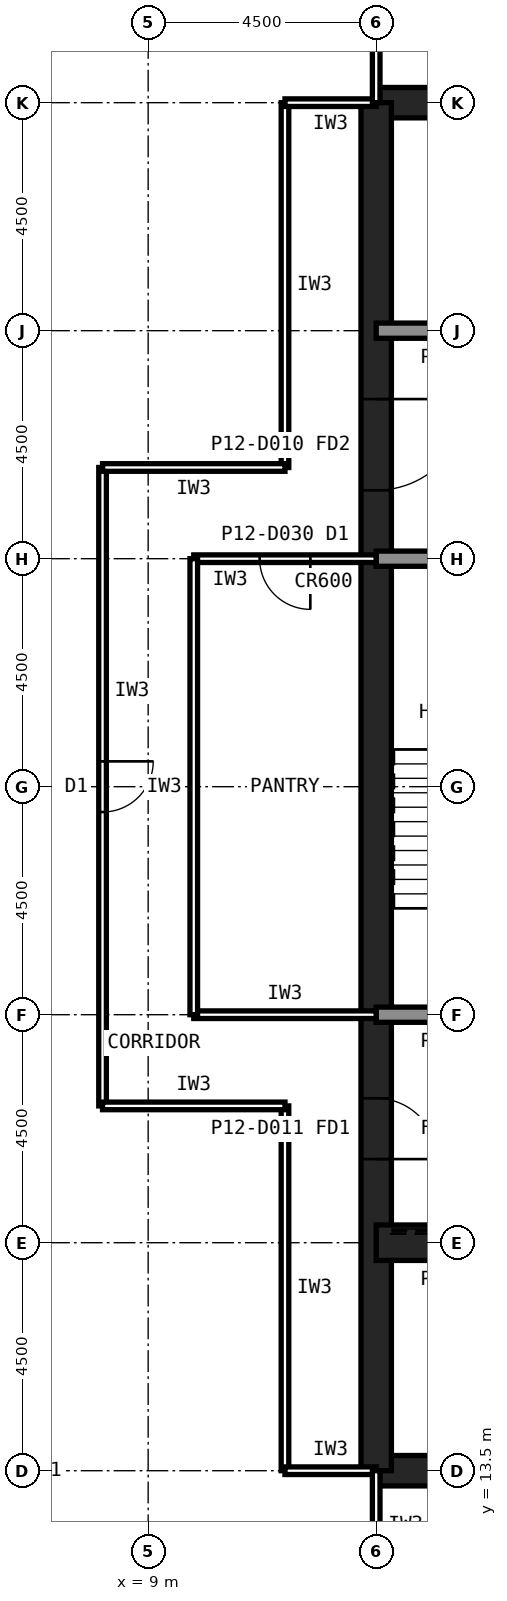
"""IFC4 building model, lengths in metres.
Left out: names, types, materials, properties, quantities, classifications, styles, units other than length and angle.
Written with IfcOpenShell. Run it as: python <this file> out.ifc"""

import sys

from ifc_helpers import new_model, si_unit, direction, frame, frame_2d, origin, place, context, subcontext, project, spatial, rectangle, extrude, element, fill, save


model = new_model("IFC4")
c1 = context("Model", 3, precision=1e-05, world=origin(), true_north=direction((0.0, 1.0)))
c2 = subcontext(c1, "Body", "Model", "MODEL_VIEW")
j1 = project(units=[si_unit("LENGTHUNIT", "METRE"), si_unit("PLANEANGLEUNIT", "RADIAN")], contexts=[c1])
p1 = place(None, origin())
s1 = spatial("IfcSite", under=j1, at=p1, CompositionType="ELEMENT")
p2 = place(p1, origin())
s2 = spatial("IfcBuilding", under=s1, at=p2, CompositionType="ELEMENT")
p3 = place(p2, frame((0.0, 0.0, 54.2)))
s3 = spatial("IfcBuildingStorey", under=s2, at=p3, CompositionType="ELEMENT", Elevation=54.2)
for number, where, z_axis, x_axis in (
    (1, (13.5, 13.5, 0.0), (0.0, 0.0, 1.0), (1.0, 0.0, 0.0)),
    (2, (40.5, 40.5, 0.0), (0.0, 0.0, 1.0), (-1.0, 0.0, 0.0)),
):
    element("IfcWall", number, at=place(p3, frame(where, z_axis=z_axis, x_axis=x_axis)), inside=s3, PredefinedType="SHEAR", context=c2, shape_type="SweptSolid", body=[
        extrude(rectangle(XDim=27.0, YDim=0.6, at=frame_2d((13.5, 0.0))), origin(), (0.0, 0.0, 1.0), 4.2),
    ])
p4 = place(p3, frame((13.5, 40.5, 0.0), z_axis=(0.0, 0.0, 1.0), x_axis=(0.0, -1.0, 0.0)))
e3 = element("IfcWall", 3, at=p4, inside=s3, PredefinedType="SHEAR", context=c2, shape_type="SweptSolid", body=[
    extrude(rectangle(XDim=27.0, YDim=0.6, at=frame_2d((13.5, 0.0))), origin(), (0.0, 0.0, 1.0), 4.2),
])
p5 = place(p4, frame((19.65, 0.0, 0.0)))
e4 = element("IfcOpeningElement", 4, at=p5, cuts=e3, PredefinedType="OPENING", context=c2, shape_type="SweptSolid", body=[
    extrude(rectangle(XDim=1.2, YDim=2.1, at=frame_2d((0.6, 1.05))), frame((0.0, 0.31, 0.0), z_axis=(0.0, -1.0, 0.0), x_axis=(1.0, 0.0, 0.0)), (0.0, 0.0, 1.0), 0.62),
])
p6 = place(p4, frame((5.85, 0.0, 0.0)))
e5 = element("IfcOpeningElement", 5, at=p6, cuts=e3, PredefinedType="OPENING", context=c2, shape_type="SweptSolid", body=[
    extrude(rectangle(XDim=1.8, YDim=2.1, at=frame_2d((0.9, 1.05))), frame((0.0, 0.31, 0.0), z_axis=(0.0, -1.0, 0.0), x_axis=(1.0, 0.0, 0.0)), (0.0, 0.0, 1.0), 0.62),
])
p7 = place(p3, frame((13.5, 18.0, 0.0), z_axis=(0.0, 0.0, 1.0), x_axis=(1.0, 0.0, 0.0)))
e6 = element("IfcWall", 6, at=p7, inside=s3, PredefinedType="SHEAR", context=c2, shape_type="SweptSolid", body=[
    extrude(rectangle(XDim=27.0, YDim=0.7, at=frame_2d((13.5, 0.0))), origin(), (0.0, 0.0, 1.0), 4.2),
])
p8 = place(p7, frame((24.3, 0.0, 0.0)))
e7 = element("IfcOpeningElement", 7, at=p8, cuts=e6, PredefinedType="OPENING", context=c2, shape_type="SweptSolid", body=[
    extrude(rectangle(XDim=0.9, YDim=2.1, at=frame_2d((0.45, 1.05))), frame((0.0, 0.36, 0.0), z_axis=(0.0, -1.0, 0.0), x_axis=(1.0, 0.0, 0.0)), (0.0, 0.0, 1.0), 0.72),
])
p9 = place(p7, frame((5.45, 0.0, 0.0)))
e8 = element("IfcOpeningElement", 8, at=p9, cuts=e6, PredefinedType="OPENING", context=c2, shape_type="SweptSolid", body=[
    extrude(rectangle(XDim=1.1, YDim=2.1, at=frame_2d((0.55, 1.05))), frame((0.0, 0.36, 0.0), z_axis=(0.0, -1.0, 0.0), x_axis=(1.0, 0.0, 0.0)), (0.0, 0.0, 1.0), 0.72),
])
p10 = place(p7, frame((8.45, 0.0, 0.0)))
e9 = element("IfcOpeningElement", 9, at=p10, cuts=e6, PredefinedType="OPENING", context=c2, shape_type="SweptSolid", body=[
    extrude(rectangle(XDim=1.1, YDim=2.1, at=frame_2d((0.55, 1.05))), frame((0.0, 0.36, 0.0), z_axis=(0.0, -1.0, 0.0), x_axis=(1.0, 0.0, 0.0)), (0.0, 0.0, 1.0), 0.72),
])
p11 = place(p7, frame((11.45, 0.0, 0.0)))
e10 = element("IfcOpeningElement", 10, at=p11, cuts=e6, PredefinedType="OPENING", context=c2, shape_type="SweptSolid", body=[
    extrude(rectangle(XDim=1.1, YDim=2.1, at=frame_2d((0.55, 1.05))), frame((0.0, 0.36, 0.0), z_axis=(0.0, -1.0, 0.0), x_axis=(1.0, 0.0, 0.0)), (0.0, 0.0, 1.0), 0.72),
])
p12 = place(p7, frame((14.45, 0.0, 0.0)))
e11 = element("IfcOpeningElement", 11, at=p12, cuts=e6, PredefinedType="OPENING", context=c2, shape_type="SweptSolid", body=[
    extrude(rectangle(XDim=1.1, YDim=2.1, at=frame_2d((0.55, 1.05))), frame((0.0, 0.36, 0.0), z_axis=(0.0, -1.0, 0.0), x_axis=(1.0, 0.0, 0.0)), (0.0, 0.0, 1.0), 0.72),
])
p13 = place(p7, frame((17.45, 0.0, 0.0)))
e12 = element("IfcOpeningElement", 12, at=p13, cuts=e6, PredefinedType="OPENING", context=c2, shape_type="SweptSolid", body=[
    extrude(rectangle(XDim=1.1, YDim=2.1, at=frame_2d((0.55, 1.05))), frame((0.0, 0.36, 0.0), z_axis=(0.0, -1.0, 0.0), x_axis=(1.0, 0.0, 0.0)), (0.0, 0.0, 1.0), 0.72),
])
p14 = place(p7, frame((20.45, 0.0, 0.0)))
e13 = element("IfcOpeningElement", 13, at=p14, cuts=e6, PredefinedType="OPENING", context=c2, shape_type="SweptSolid", body=[
    extrude(rectangle(XDim=1.1, YDim=2.1, at=frame_2d((0.55, 1.05))), frame((0.0, 0.36, 0.0), z_axis=(0.0, -1.0, 0.0), x_axis=(1.0, 0.0, 0.0)), (0.0, 0.0, 1.0), 0.72),
])
p15 = place(p7, frame((1.6, 0.0, 0.0)))
e14 = element("IfcOpeningElement", 14, at=p15, cuts=e6, PredefinedType="OPENING", context=c2, shape_type="SweptSolid", body=[
    extrude(rectangle(XDim=1.3, YDim=2.2, at=frame_2d((0.65, 1.1))), frame((0.0, 0.36, 0.0), z_axis=(0.0, -1.0, 0.0), x_axis=(1.0, 0.0, 0.0)), (0.0, 0.0, 1.0), 0.72),
])
p16 = place(p3, frame((13.5, 36.0, 0.0), z_axis=(0.0, 0.0, 1.0), x_axis=(1.0, 0.0, 0.0)))
e15 = element("IfcWall", 15, at=p16, inside=s3, PredefinedType="SOLIDWALL", context=c2, shape_type="SweptSolid", body=[
    extrude(rectangle(XDim=27.0, YDim=0.3, at=frame_2d((13.5, 0.0))), origin(), (0.0, 0.0, 1.0), 4.04),
])
p17 = place(p16, frame((1.8, 0.0, 0.0)))
e16 = element("IfcOpeningElement", 16, at=p17, cuts=e15, PredefinedType="OPENING", context=c2, shape_type="SweptSolid", body=[
    extrude(rectangle(XDim=0.9, YDim=2.1, at=frame_2d((0.45, 1.05))), frame((0.0, 0.16, 0.0), z_axis=(0.0, -1.0, 0.0), x_axis=(1.0, 0.0, 0.0)), (0.0, 0.0, 1.0), 0.32),
])
p18 = place(p16, frame((24.1, 0.0, 0.0)))
e17 = element("IfcOpeningElement", 17, at=p18, cuts=e15, PredefinedType="OPENING", context=c2, shape_type="SweptSolid", body=[
    extrude(rectangle(XDim=1.3, YDim=2.2, at=frame_2d((0.65, 1.1))), frame((0.0, 0.16, 0.0), z_axis=(0.0, -1.0, 0.0), x_axis=(1.0, 0.0, 0.0)), (0.0, 0.0, 1.0), 0.32),
])
p19 = place(p3, frame((13.5, 22.5, 0.0), z_axis=(0.0, 0.0, 1.0), x_axis=(1.0, 0.0, 0.0)))
e18 = element("IfcWall", 18, at=p19, inside=s3, PredefinedType="SOLIDWALL", context=c2, shape_type="SweptSolid", body=[
    extrude(rectangle(XDim=27.0, YDim=0.3, at=frame_2d((13.5, 0.0))), origin(), (0.0, 0.0, 1.0), 4.04),
])
p20 = place(p19, frame((1.65, 0.0, 0.0)))
e19 = element("IfcOpeningElement", 19, at=p20, cuts=e18, PredefinedType="OPENING", context=c2, shape_type="SweptSolid", body=[
    extrude(rectangle(XDim=1.2, YDim=2.1, at=frame_2d((0.6, 1.05))), frame((0.0, 0.16, 0.0), z_axis=(0.0, -1.0, 0.0), x_axis=(1.0, 0.0, 0.0)), (0.0, 0.0, 1.0), 0.32),
])
p21 = place(p19, frame((6.025, 0.0, 0.0)))
e20 = element("IfcOpeningElement", 20, at=p21, cuts=e18, PredefinedType="OPENING", context=c2, shape_type="SweptSolid", body=[
    extrude(rectangle(XDim=1.0, YDim=2.1, at=frame_2d((0.5, 1.05))), frame((0.0, 0.16, 0.0), z_axis=(0.0, -1.0, 0.0), x_axis=(1.0, 0.0, 0.0)), (0.0, 0.0, 1.0), 0.32),
])
p22 = place(p19, frame((10.525, 0.0, 0.0)))
e21 = element("IfcOpeningElement", 21, at=p22, cuts=e18, PredefinedType="OPENING", context=c2, shape_type="SweptSolid", body=[
    extrude(rectangle(XDim=1.0, YDim=2.1, at=frame_2d((0.5, 1.05))), frame((0.0, 0.16, 0.0), z_axis=(0.0, -1.0, 0.0), x_axis=(1.0, 0.0, 0.0)), (0.0, 0.0, 1.0), 0.32),
])
p23 = place(p19, frame((19.75, 0.0, 0.0)))
e22 = element("IfcOpeningElement", 22, at=p23, cuts=e18, PredefinedType="OPENING", context=c2, shape_type="SweptSolid", body=[
    extrude(rectangle(XDim=1.0, YDim=2.1, at=frame_2d((0.5, 1.05))), frame((0.0, 0.16, 0.0), z_axis=(0.0, -1.0, 0.0), x_axis=(1.0, 0.0, 0.0)), (0.0, 0.0, 1.0), 0.32),
])
p24 = place(p19, frame((15.05, 0.0, 0.0)))
e23 = element("IfcOpeningElement", 23, at=p24, cuts=e18, PredefinedType="OPENING", context=c2, shape_type="SweptSolid", body=[
    extrude(rectangle(XDim=1.4, YDim=2.4, at=frame_2d((0.7, 1.2))), frame((0.0, 0.16, 0.0), z_axis=(0.0, -1.0, 0.0), x_axis=(1.0, 0.0, 0.0)), (0.0, 0.0, 1.0), 0.32),
])
p25 = place(p3, frame((13.5, 31.5, 0.0), z_axis=(0.0, 0.0, 1.0), x_axis=(1.0, 0.0, 0.0)))
e24 = element("IfcWall", 24, at=p25, inside=s3, PredefinedType="SOLIDWALL", context=c2, shape_type="SweptSolid", body=[
    extrude(rectangle(XDim=27.0, YDim=0.3, at=frame_2d((13.5, 0.0))), origin(), (0.0, 0.0, 1.0), 4.04),
])
p26 = place(p25, frame((24.15, 0.0, 0.0)))
e25 = element("IfcOpeningElement", 25, at=p26, cuts=e24, PredefinedType="OPENING", context=c2, shape_type="SweptSolid", body=[
    extrude(rectangle(XDim=1.2, YDim=2.1, at=frame_2d((0.6, 1.05))), frame((0.0, 0.16, 0.0), z_axis=(0.0, -1.0, 0.0), x_axis=(1.0, 0.0, 0.0)), (0.0, 0.0, 1.0), 0.32),
])
p27 = place(p25, frame((15.3, 0.0, 0.0)))
e26 = element("IfcOpeningElement", 26, at=p27, cuts=e24, PredefinedType="OPENING", context=c2, shape_type="SweptSolid", body=[
    extrude(rectangle(XDim=0.9, YDim=2.1, at=frame_2d((0.45, 1.05))), frame((0.0, 0.16, 0.0), z_axis=(0.0, -1.0, 0.0), x_axis=(1.0, 0.0, 0.0)), (0.0, 0.0, 1.0), 0.32),
])
p28 = place(p25, frame((19.8, 0.0, 0.0)))
e27 = element("IfcOpeningElement", 27, at=p28, cuts=e24, PredefinedType="OPENING", context=c2, shape_type="SweptSolid", body=[
    extrude(rectangle(XDim=0.9, YDim=2.1, at=frame_2d((0.45, 1.05))), frame((0.0, 0.16, 0.0), z_axis=(0.0, -1.0, 0.0), x_axis=(1.0, 0.0, 0.0)), (0.0, 0.0, 1.0), 0.32),
])
p29 = place(p3, frame((8.1, 33.3, 0.0), z_axis=(0.0, 0.0, 1.0), x_axis=(0.0, -1.0, 0.0)))
e28 = element("IfcWall", 28, at=p29, inside=s3, PredefinedType="PARTITIONING", context=c2, shape_type="SweptSolid", body=[
    extrude(rectangle(XDim=12.6, YDim=0.15, at=frame_2d((6.3, 0.0))), origin(), (0.0, 0.0, 1.0), 4.04),
])
p30 = place(p29, frame((5.8, 0.0, 0.0)))
e29 = element("IfcOpeningElement", 29, at=p30, cuts=e28, PredefinedType="OPENING", context=c2, shape_type="SweptSolid", body=[
    extrude(rectangle(XDim=1.0, YDim=2.1, at=frame_2d((0.5, 1.05))), frame((0.0, 0.085, 0.0), z_axis=(0.0, -1.0, 0.0), x_axis=(1.0, 0.0, 0.0)), (0.0, 0.0, 1.0), 0.17),
])
for number, where, z_axis, x_axis in (
    (30, (11.7, 20.7, 0.0), (0.0, 0.0, 1.0), (0.0, -1.0, 0.0)),
    (31, (11.7, 40.5, 0.0), (0.0, 0.0, 1.0), (0.0, -1.0, 0.0)),
):
    element("IfcWall", number, at=place(p3, frame(where, z_axis=z_axis, x_axis=x_axis)), inside=s3, PredefinedType="PARTITIONING", context=c2, shape_type="SweptSolid", body=[
        extrude(rectangle(XDim=7.2, YDim=0.15, at=frame_2d((3.6, 0.0))), origin(), (0.0, 0.0, 1.0), 4.04),
    ])
for number, where, z_axis, x_axis in (
    (32, (8.1, 20.7, 0.0), (0.0, 0.0, 1.0), (1.0, 0.0, 0.0)),
    (33, (11.7, 33.3, 0.0), (0.0, 0.0, 1.0), (-1.0, 0.0, 0.0)),
):
    element("IfcWall", number, at=place(p3, frame(where, z_axis=z_axis, x_axis=x_axis)), inside=s3, PredefinedType="PARTITIONING", context=c2, shape_type="SweptSolid", body=[
        extrude(rectangle(XDim=3.6, YDim=0.15, at=frame_2d((1.8, 0.0))), origin(), (0.0, 0.0, 1.0), 4.04),
    ])
for number, where, z_axis, x_axis in (
    (34, (11.7, 13.5, 0.0), (0.0, 0.0, 1.0), (1.0, 0.0, 0.0)),
    (35, (13.5, 40.5, 0.0), (0.0, 0.0, 1.0), (-1.0, 0.0, 0.0)),
):
    element("IfcWall", number, at=place(p3, frame(where, z_axis=z_axis, x_axis=x_axis)), inside=s3, PredefinedType="PARTITIONING", context=c2, shape_type="SweptSolid", body=[
        extrude(rectangle(XDim=1.8, YDim=0.15, at=frame_2d((0.9, 0.0))), origin(), (0.0, 0.0, 1.0), 3.189),
    ])
p31 = place(p3, frame((13.5, 13.5, 0.0), z_axis=(0.0, 0.0, 1.0), x_axis=(0.0, -1.0, 0.0)))
e36 = element("IfcWall", 36, at=p31, inside=s3, PredefinedType="PARTITIONING", context=c2, shape_type="SweptSolid", body=[
    extrude(rectangle(XDim=5.4, YDim=0.15, at=frame_2d((2.7, 0.0))), origin(), (0.0, 0.0, 1.0), 3.189),
])
p32 = place(p31, frame((2.2, 0.0, 0.0)))
e37 = element("IfcOpeningElement", 37, at=p32, cuts=e36, PredefinedType="OPENING", context=c2, shape_type="SweptSolid", body=[
    extrude(rectangle(XDim=1.0, YDim=2.1, at=frame_2d((0.5, 1.05))), frame((0.0, 0.085, 0.0), z_axis=(0.0, -1.0, 0.0), x_axis=(1.0, 0.0, 0.0)), (0.0, 0.0, 1.0), 0.17),
])
p33 = place(p3, frame((13.5, 45.0, 0.0), z_axis=(0.0, 0.0, 1.0), x_axis=(0.0, -1.0, 0.0)))
e38 = element("IfcWall", 38, at=p33, inside=s3, PredefinedType="PARTITIONING", context=c2, shape_type="SweptSolid", body=[
    extrude(rectangle(XDim=4.5, YDim=0.15, at=frame_2d((2.25, 0.0))), origin(), (0.0, 0.0, 1.0), 3.189),
])
p34 = place(p3, frame((9.9, 22.5, 0.0), z_axis=(0.0, 0.0, 1.0), x_axis=(1.0, 0.0, 0.0)))
e39 = element("IfcWall", 39, at=p34, inside=s3, PredefinedType="PARTITIONING", context=c2, shape_type="SweptSolid", body=[
    extrude(rectangle(XDim=3.6, YDim=0.15, at=frame_2d((1.8, 0.0))), origin(), (0.0, 0.0, 1.0), 3.189),
])
p35 = place(p3, frame((13.5, 31.5, 0.0), z_axis=(0.0, 0.0, 1.0), x_axis=(-1.0, 0.0, 0.0)))
e40 = element("IfcWall", 40, at=p35, inside=s3, PredefinedType="PARTITIONING", context=c2, shape_type="SweptSolid", body=[
    extrude(rectangle(XDim=3.6, YDim=0.15, at=frame_2d((1.8, 0.0))), origin(), (0.0, 0.0, 1.0), 3.189),
])
p36 = place(p35, frame((1.3, 0.0, 0.0)))
e41 = element("IfcOpeningElement", 41, at=p36, cuts=e40, PredefinedType="OPENING", context=c2, shape_type="SweptSolid", body=[
    extrude(rectangle(XDim=1.0, YDim=2.1, at=frame_2d((0.5, 1.05))), frame((0.0, 0.085, 0.0), z_axis=(0.0, -1.0, 0.0), x_axis=(1.0, 0.0, 0.0)), (0.0, 0.0, 1.0), 0.17),
])
p37 = place(p3, frame((9.9, 31.5, 0.0), z_axis=(0.0, 0.0, 1.0), x_axis=(0.0, -1.0, 0.0)))
e42 = element("IfcWall", 42, at=p37, inside=s3, PredefinedType="PARTITIONING", context=c2, shape_type="SweptSolid", body=[
    extrude(rectangle(XDim=9.0, YDim=0.15, at=frame_2d((4.5, 0.0))), origin(), (0.0, 0.0, 1.0), 4.04),
])
p38 = place(p5, origin())
e43 = element("IfcDoor", 43, at=p38, inside=s3, OperationType="SINGLE_SWING_RIGHT", PredefinedType="DOOR", context=c2, shape_type="SweptSolid", body=[
    extrude(rectangle(XDim=1.2, YDim=2.1, at=frame_2d((0.6, 1.05))), frame((0.0, 0.025, 0.0), z_axis=(0.0, -1.0, 0.0), x_axis=(1.0, 0.0, 0.0)), (0.0, 0.0, 1.0), 0.05),
])
fill(e4, e43)
p39 = place(p6, origin())
e44 = element("IfcDoor", 44, at=p39, inside=s3, OperationType="SINGLE_SWING_LEFT", PredefinedType="DOOR", context=c2, shape_type="SweptSolid", body=[
    extrude(rectangle(XDim=1.8, YDim=2.1, at=frame_2d((0.9, 1.05))), frame((0.0, 0.025, 0.0), z_axis=(0.0, -1.0, 0.0), x_axis=(1.0, 0.0, 0.0)), (0.0, 0.0, 1.0), 0.05),
])
fill(e5, e44)
p40 = place(p30, origin())
e45 = element("IfcDoor", 45, at=p40, inside=s3, OperationType="SINGLE_SWING_LEFT", PredefinedType="DOOR", context=c2, shape_type="SweptSolid", body=[
    extrude(rectangle(XDim=1.0, YDim=2.1, at=frame_2d((0.5, 1.05))), frame((0.0, 0.025, 0.0), z_axis=(0.0, -1.0, 0.0), x_axis=(1.0, 0.0, 0.0)), (0.0, 0.0, 1.0), 0.05),
])
fill(e29, e45)
p41 = place(p36, origin())
e46 = element("IfcDoor", 46, at=p41, inside=s3, OperationType="SINGLE_SWING_LEFT", PredefinedType="DOOR", context=c2, shape_type="SweptSolid", body=[
    extrude(rectangle(XDim=1.0, YDim=2.1, at=frame_2d((0.5, 1.05))), frame((0.0, 0.025, 0.0), z_axis=(0.0, -1.0, 0.0), x_axis=(1.0, 0.0, 0.0)), (0.0, 0.0, 1.0), 0.05),
])
fill(e41, e46)
save(model, sys.argv[1])
